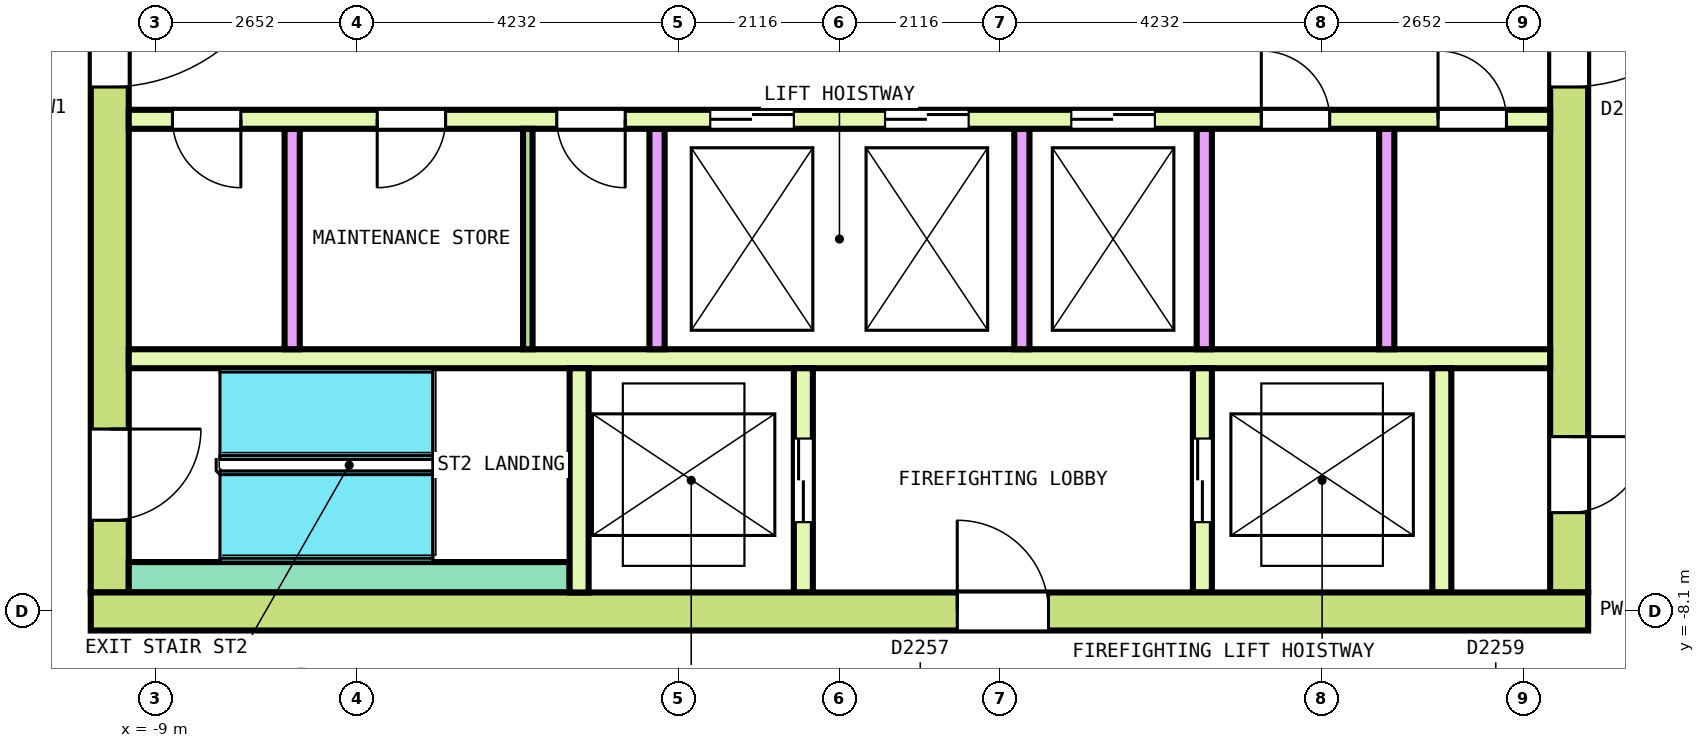
"""IFC4 building model, lengths in metres.
Left out: names, types, materials, properties, quantities, classifications, styles, units other than length and angle.
Written with IfcOpenShell. Run it as: python <this file> out.ifc"""

import sys

from ifc_helpers import new_model, si_unit, direction, frame, frame_2d, origin, place, context, subcontext, project, spatial, rectangle, extrude, element, fill, save


model = new_model("IFC4")
c1 = context("Model", 3, precision=1e-05, world=origin(), true_north=direction((0.0, 1.0)))
c2 = subcontext(c1, "Body", "Model", "MODEL_VIEW")
j1 = project(units=[si_unit("LENGTHUNIT", "METRE"), si_unit("PLANEANGLEUNIT", "RADIAN")], contexts=[c1])
p1 = place(None, origin())
s1 = spatial("IfcSite", under=j1, at=p1, CompositionType="ELEMENT")
p2 = place(p1, origin())
s2 = spatial("IfcBuilding", under=s1, at=p2, CompositionType="ELEMENT")
p3 = place(p2, frame((0.0, 0.0, 295.0)))
s3 = spatial("IfcBuildingStorey", under=s2, at=p3, CompositionType="ELEMENT", Elevation=295.0)
p4 = place(p3, frame((-9.85, -8.1, 0.0), z_axis=(0.0, 0.0, 1.0), x_axis=(1.0, 0.0, 0.0)))
e1 = element("IfcWall", 1, at=p4, inside=s3, PredefinedType="SHEAR", context=c2, shape_type="SweptSolid", body=[
    extrude(rectangle(XDim=19.7, YDim=0.5, at=frame_2d((9.85, 0.0))), origin(), (0.0, 0.0, 1.0), 3.7),
])
p5 = place(p4, frame((11.4, 0.0, 0.0)))
e2 = element("IfcOpeningElement", 2, at=p5, cuts=e1, PredefinedType="OPENING", context=c2, shape_type="SweptSolid", body=[
    extrude(rectangle(XDim=1.2, YDim=2.1, at=frame_2d((0.6, 1.05))), frame((0.0, 0.26, 0.0), z_axis=(0.0, -1.0, 0.0), x_axis=(1.0, 0.0, 0.0)), (0.0, 0.0, 1.0), 0.52),
])
p6 = place(p3, frame((-9.6, -7.85, 0.0), z_axis=(0.0, 0.0, 1.0), x_axis=(0.0, 1.0, 0.0)))
e3 = element("IfcWall", 3, at=p6, inside=s3, PredefinedType="SHEAR", context=c2, shape_type="SweptSolid", body=[
    extrude(rectangle(XDim=15.7, YDim=0.5, at=frame_2d((7.85, 0.0))), origin(), (0.0, 0.0, 1.0), 3.7),
])
p7 = place(p6, frame((6.65, 0.0, 0.0)))
e4 = element("IfcOpeningElement", 4, at=p7, cuts=e3, PredefinedType="OPENING", context=c2, shape_type="SweptSolid", body=[
    extrude(rectangle(XDim=2.4, YDim=2.1, at=frame_2d((1.2, 1.05))), frame((0.0, 0.26, 0.0), z_axis=(0.0, -1.0, 0.0), x_axis=(1.0, 0.0, 0.0)), (0.0, 0.0, 1.0), 0.52),
])
p8 = place(p6, frame((13.55, 0.0, 0.0)))
e5 = element("IfcOpeningElement", 5, at=p8, cuts=e3, PredefinedType="OPENING", context=c2, shape_type="SweptSolid", body=[
    extrude(rectangle(XDim=1.2, YDim=2.1, at=frame_2d((0.6, 1.05))), frame((0.0, 0.26, 0.0), z_axis=(0.0, -1.0, 0.0), x_axis=(1.0, 0.0, 0.0)), (0.0, 0.0, 1.0), 0.52),
])
p9 = place(p6, frame((0.95, 0.0, 0.0)))
e6 = element("IfcOpeningElement", 6, at=p9, cuts=e3, PredefinedType="OPENING", context=c2, shape_type="SweptSolid", body=[
    extrude(rectangle(XDim=1.2, YDim=2.1, at=frame_2d((0.6, 1.05))), frame((0.0, 0.26, 0.0), z_axis=(0.0, -1.0, 0.0), x_axis=(1.0, 0.0, 0.0)), (0.0, 0.0, 1.0), 0.52),
])
p10 = place(p3, frame((9.6, -7.85, 0.0), z_axis=(0.0, 0.0, 1.0), x_axis=(0.0, 1.0, 0.0)))
e7 = element("IfcWall", 7, at=p10, inside=s3, PredefinedType="SHEAR", context=c2, shape_type="SweptSolid", body=[
    extrude(rectangle(XDim=15.7, YDim=0.5, at=frame_2d((7.85, 0.0))), origin(), (0.0, 0.0, 1.0), 3.7),
])
p11 = place(p10, frame((6.65, 0.0, 0.0)))
e8 = element("IfcOpeningElement", 8, at=p11, cuts=e7, PredefinedType="OPENING", context=c2, shape_type="SweptSolid", body=[
    extrude(rectangle(XDim=2.4, YDim=2.1, at=frame_2d((1.2, 1.05))), frame((0.0, 0.26, 0.0), z_axis=(0.0, -1.0, 0.0), x_axis=(1.0, 0.0, 0.0)), (0.0, 0.0, 1.0), 0.52),
])
p12 = place(p10, frame((13.55, 0.0, 0.0)))
e9 = element("IfcOpeningElement", 9, at=p12, cuts=e7, PredefinedType="OPENING", context=c2, shape_type="SweptSolid", body=[
    extrude(rectangle(XDim=1.2, YDim=2.1, at=frame_2d((0.6, 1.05))), frame((0.0, 0.26, 0.0), z_axis=(0.0, -1.0, 0.0), x_axis=(1.0, 0.0, 0.0)), (0.0, 0.0, 1.0), 0.52),
])
p13 = place(p10, frame((1.05, 0.0, 0.0)))
e10 = element("IfcOpeningElement", 10, at=p13, cuts=e7, PredefinedType="OPENING", context=c2, shape_type="SweptSolid", body=[
    extrude(rectangle(XDim=1.0, YDim=2.1, at=frame_2d((0.5, 1.05))), frame((0.0, 0.26, 0.0), z_axis=(0.0, -1.0, 0.0), x_axis=(1.0, 0.0, 0.0)), (0.0, 0.0, 1.0), 0.52),
])
p14 = place(p3, frame((-9.35, -1.625, 0.0), z_axis=(0.0, 0.0, 1.0), x_axis=(1.0, 0.0, 0.0)))
e11 = element("IfcWall", 11, at=p14, inside=s3, PredefinedType="SOLIDWALL", context=c2, shape_type="SweptSolid", body=[
    extrude(rectangle(XDim=18.7, YDim=0.25, at=frame_2d((9.35, 0.0))), origin(), (0.0, 0.0, 1.0), 3.7),
])
p15 = place(p14, frame((7.65, 0.0, 0.0)))
e12 = element("IfcOpeningElement", 12, at=p15, cuts=e11, PredefinedType="OPENING", context=c2, shape_type="SweptSolid", body=[
    extrude(rectangle(XDim=1.1, YDim=2.1, at=frame_2d((0.55, 1.05))), frame((0.0, 0.135, 0.0), z_axis=(0.0, -1.0, 0.0), x_axis=(1.0, 0.0, 0.0)), (0.0, 0.0, 1.0), 0.27),
])
p16 = place(p14, frame((9.95, 0.0, 0.0)))
e13 = element("IfcOpeningElement", 13, at=p16, cuts=e11, PredefinedType="OPENING", context=c2, shape_type="SweptSolid", body=[
    extrude(rectangle(XDim=1.1, YDim=2.1, at=frame_2d((0.55, 1.05))), frame((0.0, 0.135, 0.0), z_axis=(0.0, -1.0, 0.0), x_axis=(1.0, 0.0, 0.0)), (0.0, 0.0, 1.0), 0.27),
])
p17 = place(p14, frame((12.4, 0.0, 0.0)))
e14 = element("IfcOpeningElement", 14, at=p17, cuts=e11, PredefinedType="OPENING", context=c2, shape_type="SweptSolid", body=[
    extrude(rectangle(XDim=1.1, YDim=2.1, at=frame_2d((0.55, 1.05))), frame((0.0, 0.135, 0.0), z_axis=(0.0, -1.0, 0.0), x_axis=(1.0, 0.0, 0.0)), (0.0, 0.0, 1.0), 0.27),
])
p18 = place(p14, frame((0.575, 0.0, 0.0)))
e15 = element("IfcOpeningElement", 15, at=p18, cuts=e11, PredefinedType="OPENING", context=c2, shape_type="SweptSolid", body=[
    extrude(rectangle(XDim=0.9, YDim=2.1, at=frame_2d((0.45, 1.05))), frame((0.0, 0.135, 0.0), z_axis=(0.0, -1.0, 0.0), x_axis=(1.0, 0.0, 0.0)), (0.0, 0.0, 1.0), 0.27),
])
p19 = place(p14, frame((3.269, 0.0, 0.0)))
e16 = element("IfcOpeningElement", 16, at=p19, cuts=e11, PredefinedType="OPENING", context=c2, shape_type="SweptSolid", body=[
    extrude(rectangle(XDim=0.9, YDim=2.1, at=frame_2d((0.45, 1.05))), frame((0.0, 0.135, 0.0), z_axis=(0.0, -1.0, 0.0), x_axis=(1.0, 0.0, 0.0)), (0.0, 0.0, 1.0), 0.27),
])
p20 = place(p14, frame((5.631, 0.0, 0.0)))
e17 = element("IfcOpeningElement", 17, at=p20, cuts=e11, PredefinedType="OPENING", context=c2, shape_type="SweptSolid", body=[
    extrude(rectangle(XDim=0.9, YDim=2.1, at=frame_2d((0.45, 1.05))), frame((0.0, 0.135, 0.0), z_axis=(0.0, -1.0, 0.0), x_axis=(1.0, 0.0, 0.0)), (0.0, 0.0, 1.0), 0.27),
])
p21 = place(p14, frame((14.9, 0.0, 0.0)))
e18 = element("IfcOpeningElement", 18, at=p21, cuts=e11, PredefinedType="OPENING", context=c2, shape_type="SweptSolid", body=[
    extrude(rectangle(XDim=0.9, YDim=2.1, at=frame_2d((0.45, 1.05))), frame((0.0, 0.135, 0.0), z_axis=(0.0, -1.0, 0.0), x_axis=(1.0, 0.0, 0.0)), (0.0, 0.0, 1.0), 0.27),
])
p22 = place(p14, frame((17.225, 0.0, 0.0)))
e19 = element("IfcOpeningElement", 19, at=p22, cuts=e11, PredefinedType="OPENING", context=c2, shape_type="SweptSolid", body=[
    extrude(rectangle(XDim=0.9, YDim=2.1, at=frame_2d((0.45, 1.05))), frame((0.0, 0.135, 0.0), z_axis=(0.0, -1.0, 0.0), x_axis=(1.0, 0.0, 0.0)), (0.0, 0.0, 1.0), 0.27),
])
p23 = place(p3, frame((-9.35, -4.775, 0.0), z_axis=(0.0, 0.0, 1.0), x_axis=(1.0, 0.0, 0.0)))
e20 = element("IfcWall", 20, at=p23, inside=s3, PredefinedType="SOLIDWALL", context=c2, shape_type="SweptSolid", body=[
    extrude(rectangle(XDim=18.7, YDim=0.25, at=frame_2d((9.35, 0.0))), origin(), (0.0, 0.0, 1.0), 3.7),
])
for number, where, z_axis, x_axis in (
    (21, (-7.2, -4.65, 0.0), (0.0, 0.0, 1.0), (0.0, 1.0, 0.0)),
    (22, (-2.4, -4.65, 0.0), (0.0, 0.0, 1.0), (0.0, 1.0, 0.0)),
    (23, (2.4, -4.65, 0.0), (0.0, 0.0, 1.0), (0.0, 1.0, 0.0)),
    (24, (4.8, -4.65, 0.0), (0.0, 0.0, 1.0), (0.0, 1.0, 0.0)),
    (25, (7.2, -4.65, 0.0), (0.0, 0.0, 1.0), (0.0, 1.0, 0.0)),
):
    element("IfcWall", number, at=place(p3, frame(where, z_axis=z_axis, x_axis=x_axis)), inside=s3, PredefinedType="SOLIDWALL", context=c2, shape_type="SweptSolid", body=[
        extrude(rectangle(XDim=2.9, YDim=0.2, at=frame_2d((1.45, 0.0))), origin(), (0.0, 0.0, 1.0), 3.7),
    ])
p24 = place(p3, frame((-9.35, -7.65, 0.0), z_axis=(0.0, 0.0, 1.0), x_axis=(1.0, 0.0, 0.0)))
e26 = element("IfcWall", 26, at=p24, inside=s3, PredefinedType="SOLIDWALL", context=c2, shape_type="SweptSolid", body=[
    extrude(rectangle(XDim=5.8, YDim=0.4, at=frame_2d((2.9, 0.0))), origin(), (0.0, 0.0, 1.0), 3.7),
])
p25 = place(p3, frame((-3.425, -7.85, 0.0), z_axis=(0.0, 0.0, 1.0), x_axis=(0.0, 1.0, 0.0)))
e27 = element("IfcWall", 27, at=p25, inside=s3, PredefinedType="SOLIDWALL", context=c2, shape_type="SweptSolid", body=[
    extrude(rectangle(XDim=2.95, YDim=0.25, at=frame_2d((1.475, 0.0))), origin(), (0.0, 0.0, 1.0), 3.7),
])
p26 = place(p3, frame((-0.475, -7.85, 0.0), z_axis=(0.0, 0.0, 1.0), x_axis=(0.0, 1.0, 0.0)))
e28 = element("IfcWall", 28, at=p26, inside=s3, PredefinedType="SOLIDWALL", context=c2, shape_type="SweptSolid", body=[
    extrude(rectangle(XDim=2.95, YDim=0.25, at=frame_2d((1.475, 0.0))), origin(), (0.0, 0.0, 1.0), 3.7),
])
p27 = place(p26, frame((0.925, 0.0, 0.0)))
e29 = element("IfcOpeningElement", 29, at=p27, cuts=e28, PredefinedType="OPENING", context=c2, shape_type="SweptSolid", body=[
    extrude(rectangle(XDim=1.1, YDim=2.1, at=frame_2d((0.55, 1.05))), frame((0.0, 0.135, 0.0), z_axis=(0.0, -1.0, 0.0), x_axis=(1.0, 0.0, 0.0)), (0.0, 0.0, 1.0), 0.27),
])
p28 = place(p3, frame((4.775, -7.85, 0.0), z_axis=(0.0, 0.0, 1.0), x_axis=(0.0, 1.0, 0.0)))
e30 = element("IfcWall", 30, at=p28, inside=s3, PredefinedType="SOLIDWALL", context=c2, shape_type="SweptSolid", body=[
    extrude(rectangle(XDim=2.95, YDim=0.25, at=frame_2d((1.475, 0.0))), origin(), (0.0, 0.0, 1.0), 3.7),
])
p29 = place(p28, frame((0.925, 0.0, 0.0)))
e31 = element("IfcOpeningElement", 31, at=p29, cuts=e30, PredefinedType="OPENING", context=c2, shape_type="SweptSolid", body=[
    extrude(rectangle(XDim=1.1, YDim=2.1, at=frame_2d((0.55, 1.05))), frame((0.0, 0.135, 0.0), z_axis=(0.0, -1.0, 0.0), x_axis=(1.0, 0.0, 0.0)), (0.0, 0.0, 1.0), 0.27),
])
p30 = place(p3, frame((7.925, -7.85, 0.0), z_axis=(0.0, 0.0, 1.0), x_axis=(0.0, 1.0, 0.0)))
e32 = element("IfcWall", 32, at=p30, inside=s3, PredefinedType="SOLIDWALL", context=c2, shape_type="SweptSolid", body=[
    extrude(rectangle(XDim=2.95, YDim=0.25, at=frame_2d((1.475, 0.0))), origin(), (0.0, 0.0, 1.0), 3.7),
])
p31 = place(p3, frame((-4.1, -4.65, 0.0), z_axis=(0.0, 0.0, 1.0), x_axis=(0.0, 1.0, 0.0)))
e33 = element("IfcWall", 33, at=p31, inside=s3, PredefinedType="PARTITIONING", context=c2, shape_type="SweptSolid", body=[
    extrude(rectangle(XDim=2.9, YDim=0.125, at=frame_2d((1.45, 0.0))), origin(), (0.0, 0.0, 1.0), 3.7),
])
p32 = place(p15, origin())
e34 = element("IfcDoor", 34, at=p32, inside=s3, OperationType="DOUBLE_DOOR_SLIDING", PredefinedType="DOOR", context=c2, shape_type="SweptSolid", body=[
    extrude(rectangle(XDim=1.1, YDim=2.1, at=frame_2d((0.55, 1.05))), frame((0.0, 0.075, 0.0), z_axis=(0.0, -1.0, 0.0), x_axis=(1.0, 0.0, 0.0)), (0.0, 0.0, 1.0), 0.15),
])
fill(e12, e34)
p33 = place(p16, origin())
e35 = element("IfcDoor", 35, at=p33, inside=s3, OperationType="DOUBLE_DOOR_SLIDING", PredefinedType="DOOR", context=c2, shape_type="SweptSolid", body=[
    extrude(rectangle(XDim=1.1, YDim=2.1, at=frame_2d((0.55, 1.05))), frame((0.0, 0.075, 0.0), z_axis=(0.0, -1.0, 0.0), x_axis=(1.0, 0.0, 0.0)), (0.0, 0.0, 1.0), 0.15),
])
fill(e13, e35)
p34 = place(p17, origin())
e36 = element("IfcDoor", 36, at=p34, inside=s3, OperationType="DOUBLE_DOOR_SLIDING", PredefinedType="DOOR", context=c2, shape_type="SweptSolid", body=[
    extrude(rectangle(XDim=1.1, YDim=2.1, at=frame_2d((0.55, 1.05))), frame((0.0, 0.075, 0.0), z_axis=(0.0, -1.0, 0.0), x_axis=(1.0, 0.0, 0.0)), (0.0, 0.0, 1.0), 0.15),
])
fill(e14, e36)
p35 = place(p27, origin())
e37 = element("IfcDoor", 37, at=p35, inside=s3, OperationType="DOUBLE_DOOR_SLIDING", PredefinedType="DOOR", context=c2, shape_type="SweptSolid", body=[
    extrude(rectangle(XDim=1.1, YDim=2.1, at=frame_2d((0.55, 1.05))), frame((0.0, 0.075, 0.0), z_axis=(0.0, -1.0, 0.0), x_axis=(1.0, 0.0, 0.0)), (0.0, 0.0, 1.0), 0.15),
])
fill(e29, e37)
p36 = place(p29, origin())
e38 = element("IfcDoor", 38, at=p36, inside=s3, OperationType="DOUBLE_DOOR_SLIDING", PredefinedType="DOOR", context=c2, shape_type="SweptSolid", body=[
    extrude(rectangle(XDim=1.1, YDim=2.1, at=frame_2d((0.55, 1.05))), frame((0.0, 0.075, 0.0), z_axis=(0.0, -1.0, 0.0), x_axis=(1.0, 0.0, 0.0)), (0.0, 0.0, 1.0), 0.15),
])
fill(e31, e38)
p37 = place(p7, origin())
e39 = element("IfcDoor", 39, at=p37, inside=s3, OperationType="DOUBLE_DOOR_SINGLE_SWING", PredefinedType="DOOR", context=c2, shape_type="SweptSolid", body=[
    extrude(rectangle(XDim=2.4, YDim=2.1, at=frame_2d((1.2, 1.05))), frame((0.0, 0.2, 0.0), z_axis=(0.0, -1.0, 0.0), x_axis=(1.0, 0.0, 0.0)), (0.0, 0.0, 1.0), 0.4),
])
fill(e4, e39)
p38 = place(p11, origin())
e40 = element("IfcDoor", 40, at=p38, inside=s3, OperationType="DOUBLE_DOOR_SINGLE_SWING", PredefinedType="DOOR", context=c2, shape_type="SweptSolid", body=[
    extrude(rectangle(XDim=2.4, YDim=2.1, at=frame_2d((1.2, 1.05))), frame((0.0, 0.2, 0.0), z_axis=(0.0, -1.0, 0.0), x_axis=(1.0, 0.0, 0.0)), (0.0, 0.0, 1.0), 0.4),
])
fill(e8, e40)
p39 = place(p9, origin())
e41 = element("IfcDoor", 41, at=p39, inside=s3, OperationType="SINGLE_SWING_LEFT", PredefinedType="DOOR", context=c2, shape_type="SweptSolid", body=[
    extrude(rectangle(XDim=1.2, YDim=2.1, at=frame_2d((0.6, 1.05))), frame((0.0, 0.2, 0.0), z_axis=(0.0, -1.0, 0.0), x_axis=(1.0, 0.0, 0.0)), (0.0, 0.0, 1.0), 0.4),
])
fill(e6, e41)
p40 = place(p5, origin())
e42 = element("IfcDoor", 42, at=p40, inside=s3, OperationType="SINGLE_SWING_LEFT", PredefinedType="DOOR", context=c2, shape_type="SweptSolid", body=[
    extrude(rectangle(XDim=1.2, YDim=2.1, at=frame_2d((0.6, 1.05))), frame((0.0, 0.2, 0.0), z_axis=(0.0, -1.0, 0.0), x_axis=(1.0, 0.0, 0.0)), (0.0, 0.0, 1.0), 0.4),
])
fill(e2, e42)
p41 = place(p13, origin())
e43 = element("IfcDoor", 43, at=p41, inside=s3, OperationType="SINGLE_SWING_LEFT", PredefinedType="DOOR", context=c2, shape_type="SweptSolid", body=[
    extrude(rectangle(XDim=1.0, YDim=2.1, at=frame_2d((0.5, 1.05))), frame((0.0, 0.2, 0.0), z_axis=(0.0, -1.0, 0.0), x_axis=(1.0, 0.0, 0.0)), (0.0, 0.0, 1.0), 0.4),
])
fill(e10, e43)
p42 = place(p18, origin())
e44 = element("IfcDoor", 44, at=p42, inside=s3, OperationType="SINGLE_SWING_RIGHT", PredefinedType="DOOR", context=c2, shape_type="SweptSolid", body=[
    extrude(rectangle(XDim=0.9, YDim=2.1, at=frame_2d((0.45, 1.05))), frame((0.0, 0.075, 0.0), z_axis=(0.0, -1.0, 0.0), x_axis=(1.0, 0.0, 0.0)), (0.0, 0.0, 1.0), 0.15),
])
fill(e15, e44)
p43 = place(p19, origin())
e45 = element("IfcDoor", 45, at=p43, inside=s3, OperationType="SINGLE_SWING_LEFT", PredefinedType="DOOR", context=c2, shape_type="SweptSolid", body=[
    extrude(rectangle(XDim=0.9, YDim=2.1, at=frame_2d((0.45, 1.05))), frame((0.0, 0.075, 0.0), z_axis=(0.0, -1.0, 0.0), x_axis=(1.0, 0.0, 0.0)), (0.0, 0.0, 1.0), 0.15),
])
fill(e16, e45)
p44 = place(p20, origin())
e46 = element("IfcDoor", 46, at=p44, inside=s3, OperationType="SINGLE_SWING_RIGHT", PredefinedType="DOOR", context=c2, shape_type="SweptSolid", body=[
    extrude(rectangle(XDim=0.9, YDim=2.1, at=frame_2d((0.45, 1.05))), frame((0.0, 0.075, 0.0), z_axis=(0.0, -1.0, 0.0), x_axis=(1.0, 0.0, 0.0)), (0.0, 0.0, 1.0), 0.15),
])
fill(e17, e46)
p45 = place(p21, origin())
e47 = element("IfcDoor", 47, at=p45, inside=s3, OperationType="SINGLE_SWING_LEFT", PredefinedType="DOOR", context=c2, shape_type="SweptSolid", body=[
    extrude(rectangle(XDim=0.9, YDim=2.1, at=frame_2d((0.45, 1.05))), frame((0.0, 0.075, 0.0), z_axis=(0.0, -1.0, 0.0), x_axis=(1.0, 0.0, 0.0)), (0.0, 0.0, 1.0), 0.15),
])
fill(e18, e47)
p46 = place(p22, origin())
e48 = element("IfcDoor", 48, at=p46, inside=s3, OperationType="SINGLE_SWING_RIGHT", PredefinedType="DOOR", context=c2, shape_type="SweptSolid", body=[
    extrude(rectangle(XDim=0.9, YDim=2.1, at=frame_2d((0.45, 1.05))), frame((0.0, 0.075, 0.0), z_axis=(0.0, -1.0, 0.0), x_axis=(1.0, 0.0, 0.0)), (0.0, 0.0, 1.0), 0.15),
])
fill(e19, e48)
save(model, sys.argv[1])
